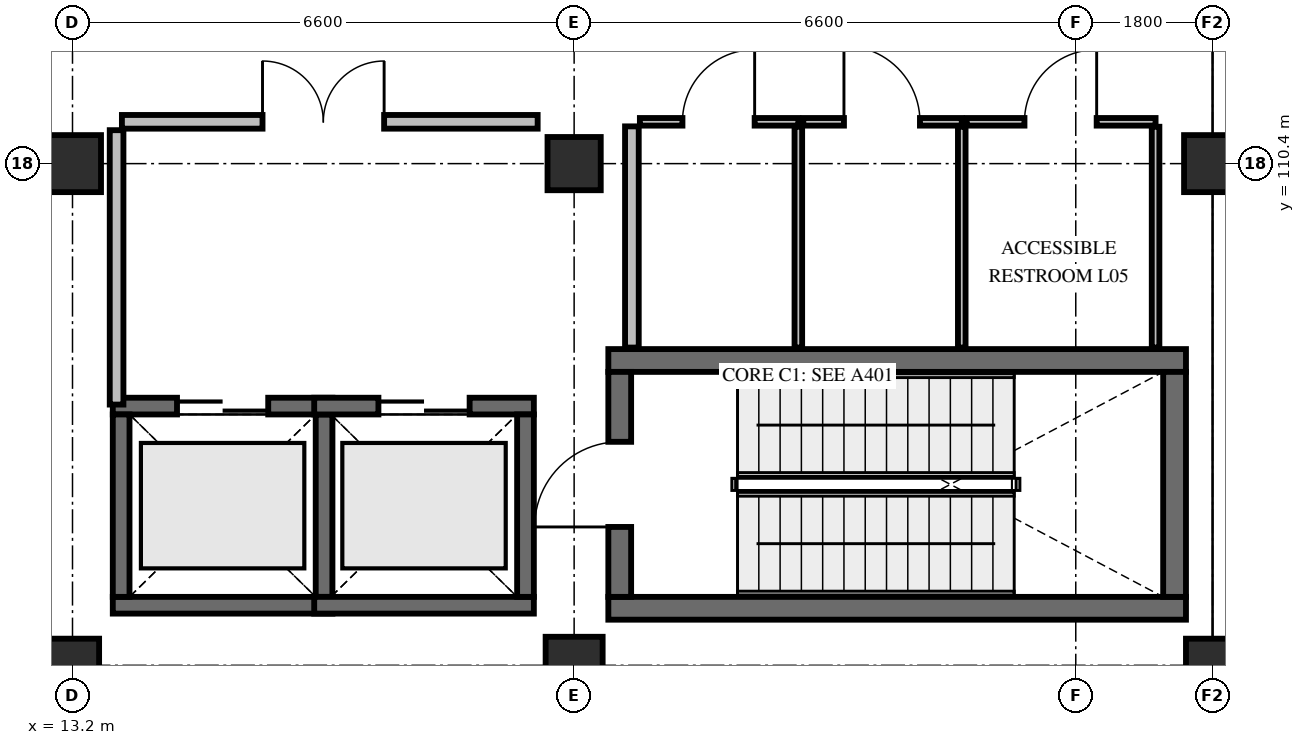
"""IFC4 building model, lengths in metres.
Left out: names, types, materials, properties, quantities, classifications, styles, units other than length and angle.
Written with IfcOpenShell. Run it as: python <this file> out.ifc"""

import sys

from ifc_helpers import new_model, si_unit, direction, frame, frame_2d, origin, origin_2d, place, context, subcontext, project, spatial, rectangle, extrude, element, fill, save


model = new_model("IFC4")
c1 = context("Model", 3, precision=1e-05, world=origin(), true_north=direction((0.0, 1.0)))
c2 = subcontext(c1, "Body", "Model", "MODEL_VIEW")
j1 = project(units=[si_unit("LENGTHUNIT", "METRE"), si_unit("PLANEANGLEUNIT", "RADIAN")], contexts=[c1])
p1 = place(None, origin())
s1 = spatial("IfcSite", under=j1, at=p1, CompositionType="ELEMENT")
p2 = place(p1, origin())
s2 = spatial("IfcBuilding", under=s1, at=p2, CompositionType="ELEMENT")
p3 = place(p2, frame((0.0, 0.0, 24.6)))
s3 = spatial("IfcBuildingStorey", under=s2, at=p3, CompositionType="ELEMENT", Elevation=24.6)
p4 = place(p3, frame((13.2, 103.8, 0.0), z_axis=(0.0, 0.0, 1.0), x_axis=(1.0, 0.0, 0.0)))
e1 = element("IfcColumn", 1, at=p4, inside=s3, PredefinedType="COLUMN", context=c2, shape_type="SweptSolid", body=[
    extrude(rectangle(XDim=0.7, YDim=0.7, at=origin_2d()), origin(), (0.0, 0.0, 1.0), 4.8),
])
for number, where, z_axis, x_axis in (
    (2, (13.2, 110.4, 0.0), (0.0, 0.0, 1.0), (1.0, 0.0, 0.0)),
    (3, (19.8, 103.8, 0.0), (0.0, 0.0, 1.0), (1.0, 0.0, 0.0)),
):
    element("IfcColumn", number, at=place(p3, frame(where, z_axis=z_axis, x_axis=x_axis)), inside=s3, PredefinedType="COLUMN", context=c2, shape_type="SweptSolid", body=[
        extrude(rectangle(XDim=0.75, YDim=0.75, at=origin_2d()), origin(), (0.0, 0.0, 1.0), 4.8),
    ])
for number, where, z_axis, x_axis in (
    (4, (19.8, 110.4, 0.0), (0.0, 0.0, 1.0), (1.0, 0.0, 0.0)),
    (5, (28.2, 103.8, 0.0), (0.0, 0.0, 1.0), (1.0, 0.0, 0.0)),
):
    element("IfcColumn", number, at=place(p3, frame(where, z_axis=z_axis, x_axis=x_axis)), inside=s3, PredefinedType="COLUMN", context=c2, shape_type="SweptSolid", body=[
        extrude(rectangle(XDim=0.7, YDim=0.7, at=origin_2d()), origin(), (0.0, 0.0, 1.0), 4.8),
    ])
p5 = place(p3, frame((28.2, 110.4, 0.0), z_axis=(0.0, 0.0, 1.0), x_axis=(1.0, 0.0, 0.0)))
e6 = element("IfcColumn", 6, at=p5, inside=s3, PredefinedType="COLUMN", context=c2, shape_type="SweptSolid", body=[
    extrude(rectangle(XDim=0.75, YDim=0.75, at=origin_2d()), origin(), (0.0, 0.0, 1.0), 4.8),
])
for number, where, z_axis, x_axis in (
    (7, (20.25, 104.55, 0.0), (0.0, 0.0, 1.0), (1.0, 0.0, 0.0)),
    (8, (20.25, 107.81, 0.0), (0.0, 0.0, 1.0), (1.0, 0.0, 0.0)),
):
    element("IfcWall", number, at=place(p3, frame(where, z_axis=z_axis, x_axis=x_axis)), inside=s3, PredefinedType="SHEAR", context=c2, shape_type="SweptSolid", body=[
        extrude(rectangle(XDim=7.6, YDim=0.3, at=frame_2d((3.8, 0.0))), origin(), (0.0, 0.0, 1.0), 4.5),
    ])
p6 = place(p3, frame((20.4, 104.7, 0.0), z_axis=(0.0, 0.0, 1.0), x_axis=(0.0, 1.0, 0.0)))
e9 = element("IfcWall", 9, at=p6, inside=s3, PredefinedType="SHEAR", context=c2, shape_type="SweptSolid", body=[
    extrude(rectangle(XDim=2.96, YDim=0.3, at=frame_2d((1.48, 0.0))), origin(), (0.0, 0.0, 1.0), 4.5),
])
p7 = place(p6, frame((0.92, 0.0, 0.0)))
e10 = element("IfcOpeningElement", 10, at=p7, cuts=e9, PredefinedType="OPENING", context=c2, shape_type="SweptSolid", body=[
    extrude(rectangle(XDim=1.12, YDim=2.2, at=frame_2d((0.56, 1.1))), frame((0.0, 0.165, 0.0), z_axis=(0.0, -1.0, 0.0), x_axis=(1.0, 0.0, 0.0)), (0.0, 0.0, 1.0), 0.33),
])
p8 = place(p3, frame((27.7, 104.7, 0.0), z_axis=(0.0, 0.0, 1.0), x_axis=(0.0, 1.0, 0.0)))
e11 = element("IfcWall", 11, at=p8, inside=s3, PredefinedType="SHEAR", context=c2, shape_type="SweptSolid", body=[
    extrude(rectangle(XDim=2.96, YDim=0.3, at=frame_2d((1.48, 0.0))), origin(), (0.0, 0.0, 1.0), 4.5),
])
p9 = place(p3, frame((13.73, 104.59, 0.0), z_axis=(0.0, 0.0, 1.0), x_axis=(1.0, 0.0, 0.0)))
e12 = element("IfcWall", 12, at=p9, inside=s3, PredefinedType="SHEAR", context=c2, shape_type="SweptSolid", body=[
    extrude(rectangle(XDim=2.89, YDim=0.22, at=frame_2d((1.445, 0.0))), origin(), (0.0, 0.0, 1.0), 4.5),
])
p10 = place(p3, frame((13.73, 107.21, 0.0), z_axis=(0.0, 0.0, 1.0), x_axis=(1.0, 0.0, 0.0)))
e13 = element("IfcWall", 13, at=p10, inside=s3, PredefinedType="SHEAR", context=c2, shape_type="SweptSolid", body=[
    extrude(rectangle(XDim=2.89, YDim=0.22, at=frame_2d((1.445, 0.0))), origin(), (0.0, 0.0, 1.0), 4.5),
])
p11 = place(p10, frame((0.845, 0.0, 0.0)))
e14 = element("IfcOpeningElement", 14, at=p11, cuts=e13, PredefinedType="OPENING", context=c2, shape_type="SweptSolid", body=[
    extrude(rectangle(XDim=1.2, YDim=2.2, at=frame_2d((0.6, 1.1))), frame((0.0, 0.125, 0.0), z_axis=(0.0, -1.0, 0.0), x_axis=(1.0, 0.0, 0.0)), (0.0, 0.0, 1.0), 0.25),
])
for number, where, z_axis, x_axis in (
    (15, (13.84, 104.7, 0.0), (0.0, 0.0, 1.0), (0.0, 1.0, 0.0)),
    (16, (16.51, 104.7, 0.0), (0.0, 0.0, 1.0), (0.0, 1.0, 0.0)),
):
    element("IfcWall", number, at=place(p3, frame(where, z_axis=z_axis, x_axis=x_axis)), inside=s3, PredefinedType="SHEAR", context=c2, shape_type="SweptSolid", body=[
        extrude(rectangle(XDim=2.4, YDim=0.22, at=frame_2d((1.2, 0.0))), origin(), (0.0, 0.0, 1.0), 4.5),
    ])
p12 = place(p3, frame((16.38, 104.59, 0.0), z_axis=(0.0, 0.0, 1.0), x_axis=(1.0, 0.0, 0.0)))
e17 = element("IfcWall", 17, at=p12, inside=s3, PredefinedType="SHEAR", context=c2, shape_type="SweptSolid", body=[
    extrude(rectangle(XDim=2.89, YDim=0.22, at=frame_2d((1.445, 0.0))), origin(), (0.0, 0.0, 1.0), 4.5),
])
p13 = place(p3, frame((16.38, 107.21, 0.0), z_axis=(0.0, 0.0, 1.0), x_axis=(1.0, 0.0, 0.0)))
e18 = element("IfcWall", 18, at=p13, inside=s3, PredefinedType="SHEAR", context=c2, shape_type="SweptSolid", body=[
    extrude(rectangle(XDim=2.89, YDim=0.22, at=frame_2d((1.445, 0.0))), origin(), (0.0, 0.0, 1.0), 4.5),
])
p14 = place(p13, frame((0.845, 0.0, 0.0)))
e19 = element("IfcOpeningElement", 19, at=p14, cuts=e18, PredefinedType="OPENING", context=c2, shape_type="SweptSolid", body=[
    extrude(rectangle(XDim=1.2, YDim=2.2, at=frame_2d((0.6, 1.1))), frame((0.0, 0.125, 0.0), z_axis=(0.0, -1.0, 0.0), x_axis=(1.0, 0.0, 0.0)), (0.0, 0.0, 1.0), 0.25),
])
p15 = place(p3, frame((19.16, 104.7, 0.0), z_axis=(0.0, 0.0, 1.0), x_axis=(0.0, 1.0, 0.0)))
e20 = element("IfcWall", 20, at=p15, inside=s3, PredefinedType="SHEAR", context=c2, shape_type="SweptSolid", body=[
    extrude(rectangle(XDim=2.4, YDim=0.22, at=frame_2d((1.2, 0.0))), origin(), (0.0, 0.0, 1.0), 4.5),
])
p16 = place(p3, frame((13.85, 110.95, 0.0), z_axis=(0.0, 0.0, 1.0), x_axis=(1.0, 0.0, 0.0)))
e21 = element("IfcWall", 21, at=p16, inside=s3, PredefinedType="PARTITIONING", context=c2, shape_type="SweptSolid", body=[
    extrude(rectangle(XDim=5.47, YDim=0.18, at=frame_2d((2.735, 0.0))), origin(), (0.0, 0.0, 1.0), 4.345),
])
p17 = place(p16, frame((1.85, 0.0, 0.0)))
e22 = element("IfcOpeningElement", 22, at=p17, cuts=e21, PredefinedType="OPENING", context=c2, shape_type="SweptSolid", body=[
    extrude(rectangle(XDim=1.6, YDim=2.25, at=frame_2d((0.8, 1.125))), frame((0.0, 0.105, 0.0), z_axis=(0.0, -1.0, 0.0), x_axis=(1.0, 0.0, 0.0)), (0.0, 0.0, 1.0), 0.21),
])
p18 = place(p3, frame((13.78, 107.23, 0.0), z_axis=(0.0, 0.0, 1.0), x_axis=(0.0, 1.0, 0.0)))
e23 = element("IfcWall", 23, at=p18, inside=s3, PredefinedType="PARTITIONING", context=c2, shape_type="SweptSolid", body=[
    extrude(rectangle(XDim=3.61, YDim=0.18, at=frame_2d((1.805, 0.0))), origin(), (0.0, 0.0, 1.0), 4.18),
])
p19 = place(p3, frame((20.56, 107.98, 0.0), z_axis=(0.0, 0.0, 1.0), x_axis=(0.0, 1.0, 0.0)))
e24 = element("IfcWall", 24, at=p19, inside=s3, PredefinedType="PARTITIONING", context=c2, shape_type="SweptSolid", body=[
    extrude(rectangle(XDim=2.91, YDim=0.18, at=frame_2d((1.455, 0.0))), origin(), (0.0, 0.0, 1.0), 3.83),
])
p20 = place(p3, frame((20.665, 110.95, 0.0), z_axis=(0.0, 0.0, 1.0), x_axis=(1.0, 0.0, 0.0)))
e25 = element("IfcWall", 25, at=p20, inside=s3, PredefinedType="PARTITIONING", context=c2, shape_type="SweptSolid", body=[
    extrude(rectangle(XDim=2.085, YDim=0.1, at=frame_2d((1.042, 0.0))), origin(), (0.0, 0.0, 1.0), 4.345),
])
p21 = place(p20, frame((0.56, 0.0, 0.0)))
e26 = element("IfcOpeningElement", 26, at=p21, cuts=e25, PredefinedType="OPENING", context=c2, shape_type="SweptSolid", body=[
    extrude(rectangle(XDim=0.95, YDim=2.15, at=frame_2d((0.475, 1.075))), frame((0.0, 0.065, 0.0), z_axis=(0.0, -1.0, 0.0), x_axis=(1.0, 0.0, 0.0)), (0.0, 0.0, 1.0), 0.13),
])
p22 = place(p3, frame((22.75, 107.98, 0.0), z_axis=(0.0, 0.0, 1.0), x_axis=(0.0, 1.0, 0.0)))
e27 = element("IfcWall", 27, at=p22, inside=s3, PredefinedType="PARTITIONING", context=c2, shape_type="SweptSolid", body=[
    extrude(rectangle(XDim=2.905, YDim=0.1, at=frame_2d((1.453, 0.0))), origin(), (0.0, 0.0, 1.0), 3.83),
])
p23 = place(p3, frame((22.815, 110.95, 0.0), z_axis=(0.0, 0.0, 1.0), x_axis=(1.0, 0.0, 0.0)))
e28 = element("IfcWall", 28, at=p23, inside=s3, PredefinedType="PARTITIONING", context=c2, shape_type="SweptSolid", body=[
    extrude(rectangle(XDim=2.085, YDim=0.1, at=frame_2d((1.042, 0.0))), origin(), (0.0, 0.0, 1.0), 4.48),
])
p24 = place(p23, frame((0.535, 0.0, 0.0)))
e29 = element("IfcOpeningElement", 29, at=p24, cuts=e28, PredefinedType="OPENING", context=c2, shape_type="SweptSolid", body=[
    extrude(rectangle(XDim=1.0, YDim=2.15, at=frame_2d((0.5, 1.075))), frame((0.0, 0.065, 0.0), z_axis=(0.0, -1.0, 0.0), x_axis=(1.0, 0.0, 0.0)), (0.0, 0.0, 1.0), 0.13),
])
p25 = place(p3, frame((24.9, 107.98, 0.0), z_axis=(0.0, 0.0, 1.0), x_axis=(0.0, 1.0, 0.0)))
e30 = element("IfcWall", 30, at=p25, inside=s3, PredefinedType="PARTITIONING", context=c2, shape_type="SweptSolid", body=[
    extrude(rectangle(XDim=2.905, YDim=0.1, at=frame_2d((1.453, 0.0))), origin(), (0.0, 0.0, 1.0), 3.83),
])
p26 = place(p3, frame((24.965, 110.95, 0.0), z_axis=(0.0, 0.0, 1.0), x_axis=(1.0, 0.0, 0.0)))
e31 = element("IfcWall", 31, at=p26, inside=s3, PredefinedType="PARTITIONING", context=c2, shape_type="SweptSolid", body=[
    extrude(rectangle(XDim=2.485, YDim=0.1, at=frame_2d((1.242, 0.0))), origin(), (0.0, 0.0, 1.0), 4.345),
])
p27 = place(p26, frame((0.76, 0.0, 0.0)))
e32 = element("IfcOpeningElement", 32, at=p27, cuts=e31, PredefinedType="OPENING", context=c2, shape_type="SweptSolid", body=[
    extrude(rectangle(XDim=0.95, YDim=2.15, at=frame_2d((0.475, 1.075))), frame((0.0, 0.065, 0.0), z_axis=(0.0, -1.0, 0.0), x_axis=(1.0, 0.0, 0.0)), (0.0, 0.0, 1.0), 0.13),
])
p28 = place(p3, frame((27.45, 107.98, 0.0), z_axis=(0.0, 0.0, 1.0), x_axis=(0.0, 1.0, 0.0)))
e33 = element("IfcWall", 33, at=p28, inside=s3, PredefinedType="PARTITIONING", context=c2, shape_type="SweptSolid", body=[
    extrude(rectangle(XDim=2.905, YDim=0.1, at=frame_2d((1.453, 0.0))), origin(), (0.0, 0.0, 1.0), 3.83),
])
p29 = place(p7, origin())
e34 = element("IfcDoor", 34, at=p29, inside=s3, OperationType="SINGLE_SWING_LEFT", PredefinedType="DOOR", context=c2, shape_type="SweptSolid", body=[
    extrude(rectangle(XDim=1.12, YDim=2.2, at=frame_2d((0.56, 1.1))), frame((0.0, 0.025, 0.0), z_axis=(0.0, -1.0, 0.0), x_axis=(1.0, 0.0, 0.0)), (0.0, 0.0, 1.0), 0.05),
])
fill(e10, e34)
p30 = place(p11, origin())
e35 = element("IfcDoor", 35, at=p30, inside=s3, OperationType="DOUBLE_DOOR_SLIDING", PredefinedType="DOOR", context=c2, shape_type="SweptSolid", body=[
    extrude(rectangle(XDim=1.2, YDim=2.2, at=frame_2d((0.6, 1.1))), frame((0.0, 0.025, 0.0), z_axis=(0.0, -1.0, 0.0), x_axis=(1.0, 0.0, 0.0)), (0.0, 0.0, 1.0), 0.05),
])
fill(e14, e35)
p31 = place(p14, origin())
e36 = element("IfcDoor", 36, at=p31, inside=s3, OperationType="DOUBLE_DOOR_SLIDING", PredefinedType="DOOR", context=c2, shape_type="SweptSolid", body=[
    extrude(rectangle(XDim=1.2, YDim=2.2, at=frame_2d((0.6, 1.1))), frame((0.0, 0.025, 0.0), z_axis=(0.0, -1.0, 0.0), x_axis=(1.0, 0.0, 0.0)), (0.0, 0.0, 1.0), 0.05),
])
fill(e19, e36)
p32 = place(p17, origin())
e37 = element("IfcDoor", 37, at=p32, inside=s3, OperationType="DOUBLE_DOOR_SINGLE_SWING", PredefinedType="DOOR", context=c2, shape_type="SweptSolid", body=[
    extrude(rectangle(XDim=1.6, YDim=2.25, at=frame_2d((0.8, 1.125))), frame((0.0, 0.025, 0.0), z_axis=(0.0, -1.0, 0.0), x_axis=(1.0, 0.0, 0.0)), (0.0, 0.0, 1.0), 0.05),
])
fill(e22, e37)
p33 = place(p21, origin())
e38 = element("IfcDoor", 38, at=p33, inside=s3, OperationType="SINGLE_SWING_RIGHT", PredefinedType="DOOR", context=c2, shape_type="SweptSolid", body=[
    extrude(rectangle(XDim=0.95, YDim=2.15, at=frame_2d((0.475, 1.075))), frame((0.0, 0.025, 0.0), z_axis=(0.0, -1.0, 0.0), x_axis=(1.0, 0.0, 0.0)), (0.0, 0.0, 1.0), 0.05),
])
fill(e26, e38)
p34 = place(p24, origin())
e39 = element("IfcDoor", 39, at=p34, inside=s3, OperationType="SINGLE_SWING_LEFT", PredefinedType="DOOR", context=c2, shape_type="SweptSolid", body=[
    extrude(rectangle(XDim=1.0, YDim=2.15, at=frame_2d((0.5, 1.075))), frame((0.0, 0.025, 0.0), z_axis=(0.0, -1.0, 0.0), x_axis=(1.0, 0.0, 0.0)), (0.0, 0.0, 1.0), 0.05),
])
fill(e29, e39)
p35 = place(p27, origin())
e40 = element("IfcDoor", 40, at=p35, inside=s3, OperationType="SINGLE_SWING_RIGHT", PredefinedType="DOOR", context=c2, shape_type="SweptSolid", body=[
    extrude(rectangle(XDim=0.95, YDim=2.15, at=frame_2d((0.475, 1.075))), frame((0.0, 0.025, 0.0), z_axis=(0.0, -1.0, 0.0), x_axis=(1.0, 0.0, 0.0)), (0.0, 0.0, 1.0), 0.05),
])
fill(e32, e40)
save(model, sys.argv[1])
